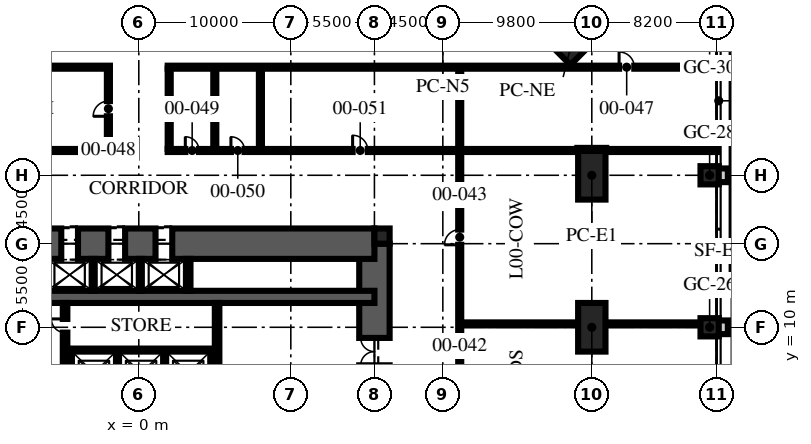
"""IFC4 building model, lengths in metres.
Left out: names, types, materials, properties, quantities, classifications, styles, units other than length and angle.
Written with IfcOpenShell. Run it as: python <this file> out.ifc"""

import sys

from ifc_helpers import new_model, si_unit, direction, frame, frame_2d, origin, origin_2d, place, context, subcontext, project, spatial, rectangle, hollow_rectangle, extrude, element, fill, save


model = new_model("IFC4")
c1 = context("Model", 3, precision=1e-05, world=origin(), true_north=direction((0.0, 1.0)))
c2 = subcontext(c1, "Body", "Model", "MODEL_VIEW")
j1 = project(units=[si_unit("LENGTHUNIT", "METRE"), si_unit("PLANEANGLEUNIT", "RADIAN")], contexts=[c1])
p1 = place(None, origin())
s1 = spatial("IfcSite", under=j1, at=p1, CompositionType="ELEMENT")
p2 = place(p1, origin())
s2 = spatial("IfcBuilding", under=s1, at=p2, CompositionType="ELEMENT")
p3 = place(p2, origin())
s3 = spatial("IfcBuildingStorey", under=s2, at=p3, CompositionType="ELEMENT", Elevation=0.0)
p4 = place(p3, frame((15.5, -15.5, -0.3), z_axis=(0.0, 0.0, 1.0), x_axis=(0.0, 1.0, 0.0)))
e1 = element("IfcWall", 1, at=p4, inside=s3, PredefinedType="SHEAR", context=c2, shape_type="SweptSolid", body=[
    extrude(rectangle(XDim=31.0, YDim=2.0, at=frame_2d((15.5, 0.0))), origin(), (0.0, 0.0, 1.0), 6.0),
])
p5 = place(p4, frame((6.5, 0.0, 0.3)))
e2 = element("IfcOpeningElement", 2, at=p5, cuts=e1, PredefinedType="OPENING", context=c2, shape_type="SweptSolid", body=[
    extrude(rectangle(XDim=1.2, YDim=2.1, at=frame_2d((0.6, 1.05))), frame((0.0, 1.01, 0.0), z_axis=(0.0, -1.0, 0.0), x_axis=(1.0, 0.0, 0.0)), (0.0, 0.0, 1.0), 2.02),
])
p6 = place(p4, frame((23.0, 0.0, 0.3)))
e3 = element("IfcOpeningElement", 3, at=p6, cuts=e1, PredefinedType="OPENING", context=c2, shape_type="SweptSolid", body=[
    extrude(rectangle(XDim=1.8, YDim=2.1, at=frame_2d((0.9, 1.05))), frame((0.0, 1.01, 0.0), z_axis=(0.0, -1.0, 0.0), x_axis=(1.0, 0.0, 0.0)), (0.0, 0.0, 1.0), 2.02),
])
p7 = place(p3, frame((-15.5, 15.5, -0.3), z_axis=(0.0, 0.0, 1.0), x_axis=(1.0, 0.0, 0.0)))
e4 = element("IfcWall", 4, at=p7, inside=s3, PredefinedType="SHEAR", context=c2, shape_type="SweptSolid", body=[
    extrude(rectangle(XDim=31.0, YDim=2.0, at=frame_2d((15.5, 0.0))), origin(), (0.0, 0.0, 1.0), 6.0),
])
p8 = place(p7, frame((10.4, 0.0, 0.3)))
e5 = element("IfcOpeningElement", 5, at=p8, cuts=e4, PredefinedType="OPENING", context=c2, shape_type="SweptSolid", body=[
    extrude(rectangle(XDim=1.1, YDim=2.1, at=frame_2d((0.55, 1.05))), frame((0.0, 1.01, 0.0), z_axis=(0.0, -1.0, 0.0), x_axis=(1.0, 0.0, 0.0)), (0.0, 0.0, 1.0), 2.02),
])
p9 = place(p7, frame((13.5, 0.0, 0.3)))
e6 = element("IfcOpeningElement", 6, at=p9, cuts=e4, PredefinedType="OPENING", context=c2, shape_type="SweptSolid", body=[
    extrude(rectangle(XDim=1.1, YDim=2.1, at=frame_2d((0.55, 1.05))), frame((0.0, 1.01, 0.0), z_axis=(0.0, -1.0, 0.0), x_axis=(1.0, 0.0, 0.0)), (0.0, 0.0, 1.0), 2.02),
])
p10 = place(p7, frame((16.6, 0.0, 0.3)))
e7 = element("IfcOpeningElement", 7, at=p10, cuts=e4, PredefinedType="OPENING", context=c2, shape_type="SweptSolid", body=[
    extrude(rectangle(XDim=1.1, YDim=2.1, at=frame_2d((0.55, 1.05))), frame((0.0, 1.01, 0.0), z_axis=(0.0, -1.0, 0.0), x_axis=(1.0, 0.0, 0.0)), (0.0, 0.0, 1.0), 2.02),
])
p11 = place(p3, frame((-15.5, 12.0, -0.3), z_axis=(0.0, 0.0, 1.0), x_axis=(1.0, 0.0, 0.0)))
e8 = element("IfcWall", 8, at=p11, inside=s3, PredefinedType="SHEAR", context=c2, shape_type="SweptSolid", body=[
    extrude(rectangle(XDim=31.0, YDim=0.8, at=frame_2d((15.5, 0.0))), origin(), (0.0, 0.0, 1.0), 6.0),
])
p12 = place(p3, frame((16.0, 16.0, -0.3), z_axis=(0.0, 0.0, 1.0), x_axis=(1.0, 0.0, 0.0)))
e9 = element("IfcColumn", 9, at=p12, inside=s3, PredefinedType="COLUMN", context=c2, shape_type="SweptSolid", body=[
    extrude(rectangle(XDim=1.0, YDim=1.0, at=origin_2d()), origin(), (0.0, 0.0, 1.0), 6.0),
])
for number, where, z_axis, x_axis in (
    (10, (29.8, 20.0, 0.0), (0.0, 0.0, 1.0), (0.0, 1.0, 0.0)),
    (11, (29.8, 10.0, 0.0), (0.0, 0.0, 1.0), (0.0, 1.0, 0.0)),
):
    element("IfcColumn", number, at=place(p3, frame(where, z_axis=z_axis, x_axis=x_axis)), inside=s3, PredefinedType="COLUMN", context=c2, shape_type="SweptSolid", body=[
        extrude(hollow_rectangle(XDim=3.2, YDim=1.8, WallThickness=0.2, at=origin_2d()), origin(), (0.0, 0.0, 1.0), 6.0),
    ])
p13 = place(p3, frame((28.394, 28.394, 0.0), z_axis=(0.0, 0.0, 1.0), x_axis=(0.707106781187, -0.707106781187, 0.0)))
e12 = element("IfcColumn", 12, at=p13, inside=s3, PredefinedType="COLUMN", context=c2, shape_type="SweptSolid", body=[
    extrude(hollow_rectangle(XDim=1.6, YDim=1.6, WallThickness=0.1, at=origin_2d()), origin(), (0.0, 0.0, 1.0), 6.0),
])
for number, where, z_axis, x_axis in (
    (13, (37.55, 10.0, 0.0), (0.0, 0.0, 1.0), (1.0, 0.0, 0.0)),
    (14, (37.55, 20.0, 0.0), (0.0, 0.0, 1.0), (1.0, 0.0, 0.0)),
):
    element("IfcColumn", number, at=place(p3, frame(where, z_axis=z_axis, x_axis=x_axis)), inside=s3, PredefinedType="COLUMN", context=c2, shape_type="SweptSolid", body=[
        extrude(rectangle(XDim=1.2, YDim=1.2, at=origin_2d()), origin(), (0.0, 0.0, 1.0), 6.0),
    ])
for number, where, z_axis, x_axis in (
    (15, (38.375, 9.55, -0.2), (0.0, 0.0, 1.0), (0.0, 1.0, 0.0)),
    (16, (38.375, 19.55, -0.2), (0.0, 0.0, 1.0), (0.0, 1.0, 0.0)),
):
    element("IfcWall", number, at=place(p3, frame(where, z_axis=z_axis, x_axis=x_axis)), inside=s3, PredefinedType="SOLIDWALL", context=c2, shape_type="SweptSolid", body=[
        extrude(rectangle(XDim=0.9, YDim=0.75, at=frame_2d((0.45, 0.0))), origin(), (0.0, 0.0, 1.0), 6.2),
    ])
p14 = place(p3, frame((-4.7, 8.5, 0.0), z_axis=(0.0, 0.0, 1.0), x_axis=(1.0, 0.0, 0.0)))
e17 = element("IfcWall", 17, at=p14, inside=s3, PredefinedType="PARTITIONING", context=c2, shape_type="SweptSolid", body=[
    extrude(rectangle(XDim=9.7, YDim=0.2, at=frame_2d((4.85, 0.0))), origin(), (0.0, 0.0, 1.0), 5.7),
])
for number, where, z_axis, x_axis in (
    (18, (-4.55, 5.6, 0.0), (0.0, 0.0, 1.0), (0.0, 1.0, 0.0)),
    (19, (4.85, 5.6, 0.0), (0.0, 0.0, 1.0), (0.0, 1.0, 0.0)),
):
    element("IfcWall", number, at=place(p3, frame(where, z_axis=z_axis, x_axis=x_axis)), inside=s3, PredefinedType="PARTITIONING", context=c2, shape_type="SweptSolid", body=[
        extrude(rectangle(XDim=2.8, YDim=0.3, at=frame_2d((1.4, 0.0))), origin(), (0.0, 0.0, 1.0), 5.7),
    ])
for number, where, z_axis, x_axis in (
    (20, (-1.4, 5.6, 0.0), (0.0, 0.0, 1.0), (0.0, 1.0, 0.0)),
    (21, (1.7, 5.6, 0.0), (0.0, 0.0, 1.0), (0.0, 1.0, 0.0)),
):
    element("IfcWall", number, at=place(p3, frame(where, z_axis=z_axis, x_axis=x_axis)), inside=s3, PredefinedType="PARTITIONING", context=c2, shape_type="SweptSolid", body=[
        extrude(rectangle(XDim=2.8, YDim=0.2, at=frame_2d((1.4, 0.0))), origin(), (0.0, 0.0, 1.0), 5.7),
    ])
p15 = place(p3, frame((3.25, 12.4, 0.0), z_axis=(0.0, 0.0, 1.0), x_axis=(0.0, 1.0, 0.0)))
e22 = element("IfcWall", 22, at=p15, inside=s3, PredefinedType="PARTITIONING", context=c2, shape_type="SweptSolid", body=[
    extrude(rectangle(XDim=2.1, YDim=0.3, at=frame_2d((1.05, 0.0))), origin(), (0.0, 0.0, 1.0), 5.7),
])
for number, where, z_axis, x_axis in (
    (23, (-3.0, 12.4, 0.0), (0.0, 0.0, 1.0), (0.0, 1.0, 0.0)),
    (24, (0.1, 12.4, 0.0), (0.0, 0.0, 1.0), (0.0, 1.0, 0.0)),
):
    element("IfcWall", number, at=place(p3, frame(where, z_axis=z_axis, x_axis=x_axis)), inside=s3, PredefinedType="PARTITIONING", context=c2, shape_type="SweptSolid", body=[
        extrude(rectangle(XDim=2.1, YDim=0.2, at=frame_2d((1.05, 0.0))), origin(), (0.0, 0.0, 1.0), 5.7),
    ])
p16 = place(p3, frame((-4.85, 5.3, 0.0), z_axis=(0.0, 0.0, 1.0), x_axis=(0.0, 1.0, 0.0)))
e25 = element("IfcWall", 25, at=p16, inside=s3, PredefinedType="PARTITIONING", context=c2, shape_type="SweptSolid", body=[
    extrude(rectangle(XDim=6.3, YDim=0.3, at=frame_2d((3.15, 0.0))), origin(), (0.0, 0.0, 1.0), 5.7),
])
p17 = place(p16, frame((4.35, 0.0, 0.0)))
e26 = element("IfcOpeningElement", 26, at=p17, cuts=e25, PredefinedType="OPENING", context=c2, shape_type="SweptSolid", body=[
    extrude(rectangle(XDim=0.9, YDim=2.1, at=frame_2d((0.45, 1.05))), frame((0.0, 0.16, 0.0), z_axis=(0.0, -1.0, 0.0), x_axis=(1.0, 0.0, 0.0)), (0.0, 0.0, 1.0), 0.32),
])
p18 = place(p3, frame((5.15, 5.3, 0.0), z_axis=(0.0, 0.0, 1.0), x_axis=(0.0, 1.0, 0.0)))
e27 = element("IfcWall", 27, at=p18, inside=s3, PredefinedType="PARTITIONING", context=c2, shape_type="SweptSolid", body=[
    extrude(rectangle(XDim=6.3, YDim=0.3, at=frame_2d((3.15, 0.0))), origin(), (0.0, 0.0, 1.0), 5.7),
])
p19 = place(p3, frame((21.111, -20.491, 0.0), z_axis=(0.0, 0.0, 1.0), x_axis=(0.0, 1.0, 0.0)))
e28 = element("IfcWall", 28, at=p19, inside=s3, PredefinedType="SOLIDWALL", context=c2, shape_type="SweptSolid", body=[
    extrude(rectangle(XDim=42.022, YDim=0.2, at=frame_2d((21.011, 0.0))), origin(), (0.0, 0.0, 1.0), 4.5),
])
p20 = place(p19, frame((5.962, 0.0, 0.0)))
e29 = element("IfcOpeningElement", 29, at=p20, cuts=e28, PredefinedType="OPENING", context=c2, shape_type="SweptSolid", body=[
    extrude(rectangle(XDim=1.8, YDim=2.4, at=frame_2d((0.9, 1.2))), frame((0.0, 0.11, 0.0), z_axis=(0.0, -1.0, 0.0), x_axis=(1.0, 0.0, 0.0)), (0.0, 0.0, 1.0), 0.22),
])
p21 = place(p19, frame((17.546, 0.0, 0.0)))
e30 = element("IfcOpeningElement", 30, at=p21, cuts=e28, PredefinedType="OPENING", context=c2, shape_type="SweptSolid", body=[
    extrude(rectangle(XDim=1.0, YDim=2.1, at=frame_2d((0.5, 1.05))), frame((0.0, 0.11, 0.0), z_axis=(0.0, -1.0, 0.0), x_axis=(1.0, 0.0, 0.0)), (0.0, 0.0, 1.0), 0.22),
])
p22 = place(p19, frame((25.991, 0.0, 0.0)))
e31 = element("IfcOpeningElement", 31, at=p22, cuts=e28, PredefinedType="OPENING", context=c2, shape_type="SweptSolid", body=[
    extrude(rectangle(XDim=1.0, YDim=2.1, at=frame_2d((0.5, 1.05))), frame((0.0, 0.11, 0.0), z_axis=(0.0, -1.0, 0.0), x_axis=(1.0, 0.0, 0.0)), (0.0, 0.0, 1.0), 0.22),
])
p23 = place(p19, frame((35.917, 0.0, 0.0)))
e32 = element("IfcOpeningElement", 32, at=p23, cuts=e28, PredefinedType="OPENING", context=c2, shape_type="SweptSolid", body=[
    extrude(rectangle(XDim=1.0, YDim=2.1, at=frame_2d((0.5, 1.05))), frame((0.0, 0.11, 0.0), z_axis=(0.0, -1.0, 0.0), x_axis=(1.0, 0.0, 0.0)), (0.0, 0.0, 1.0), 0.22),
])
p24 = place(p3, frame((21.211, 10.222, 0.0), z_axis=(0.0, 0.0, 1.0), x_axis=(1.0, 0.0, 0.0)))
e33 = element("IfcWall", 33, at=p24, inside=s3, PredefinedType="SOLIDWALL", context=c2, shape_type="SweptSolid", body=[
    extrude(rectangle(XDim=7.659, YDim=0.2, at=frame_2d((3.83, 0.0))), origin(), (0.0, 0.0, 1.0), 4.5),
])
p25 = place(p3, frame((30.73, 10.222, 0.0), z_axis=(0.0, 0.0, 1.0), x_axis=(1.0, 0.0, 0.0)))
e34 = element("IfcWall", 34, at=p25, inside=s3, PredefinedType="SOLIDWALL", context=c2, shape_type="SweptSolid", body=[
    extrude(rectangle(XDim=6.19, YDim=0.2, at=frame_2d((3.095, 0.0))), origin(), (0.0, 0.0, 1.0), 4.7),
])
p26 = place(p3, frame((-28.85, 21.631, 0.0), z_axis=(0.0, 0.0, 1.0), x_axis=(1.0, 0.0, 0.0)))
e35 = element("IfcWall", 35, at=p26, inside=s3, PredefinedType="SOLIDWALL", context=c2, shape_type="SweptSolid", body=[
    extrude(rectangle(XDim=26.95, YDim=0.2, at=frame_2d((13.475, 0.0))), origin(), (0.0, 0.0, 1.0), 4.5),
])
p27 = place(p3, frame((1.9, 21.631, 0.0), z_axis=(0.0, 0.0, 1.0), x_axis=(1.0, 0.0, 0.0)))
e36 = element("IfcWall", 36, at=p27, inside=s3, PredefinedType="SOLIDWALL", context=c2, shape_type="SweptSolid", body=[
    extrude(rectangle(XDim=26.95, YDim=0.2, at=frame_2d((13.475, 0.0))), origin(), (0.0, 0.0, 1.0), 4.5),
])
p28 = place(p27, frame((1.16, 0.0, 0.0)))
e37 = element("IfcOpeningElement", 37, at=p28, cuts=e36, PredefinedType="OPENING", context=c2, shape_type="SweptSolid", body=[
    extrude(rectangle(XDim=0.9, YDim=2.1, at=frame_2d((0.45, 1.05))), frame((0.0, 0.11, 0.0), z_axis=(0.0, -1.0, 0.0), x_axis=(1.0, 0.0, 0.0)), (0.0, 0.0, 1.0), 0.22),
])
p29 = place(p27, frame((4.16, 0.0, 0.0)))
e38 = element("IfcOpeningElement", 38, at=p29, cuts=e36, PredefinedType="OPENING", context=c2, shape_type="SweptSolid", body=[
    extrude(rectangle(XDim=0.9, YDim=2.1, at=frame_2d((0.45, 1.05))), frame((0.0, 0.11, 0.0), z_axis=(0.0, -1.0, 0.0), x_axis=(1.0, 0.0, 0.0)), (0.0, 0.0, 1.0), 0.22),
])
p30 = place(p27, frame((12.166, 0.0, 0.0)))
e39 = element("IfcOpeningElement", 39, at=p30, cuts=e36, PredefinedType="OPENING", context=c2, shape_type="SweptSolid", body=[
    extrude(rectangle(XDim=1.0, YDim=2.1, at=frame_2d((0.5, 1.05))), frame((0.0, 0.11, 0.0), z_axis=(0.0, -1.0, 0.0), x_axis=(1.0, 0.0, 0.0)), (0.0, 0.0, 1.0), 0.22),
])
p31 = place(p3, frame((30.75, 21.631, 0.0), z_axis=(0.0, 0.0, 1.0), x_axis=(1.0, 0.0, 0.0)))
e40 = element("IfcWall", 40, at=p31, inside=s3, PredefinedType="SOLIDWALL", context=c2, shape_type="SweptSolid", body=[
    extrude(rectangle(XDim=7.325, YDim=0.2, at=frame_2d((3.663, 0.0))), origin(), (0.0, 0.0, 1.0), 4.7),
])
p32 = place(p3, frame((28.85, 21.702, 0.0), z_axis=(0.0, 0.0, 1.0), x_axis=(1.0, 0.0, 0.0)))
e41 = element("IfcWall", 41, at=p32, inside=s3, PredefinedType="SOLIDWALL", context=c2, shape_type="SweptSolid", body=[
    extrude(rectangle(XDim=1.9, YDim=0.2, at=frame_2d((0.95, 0.0))), origin(), (0.0, 0.0, 1.0), 4.7),
])
p33 = place(p3, frame((-2.0, 21.731, 0.0), z_axis=(0.0, 0.0, 1.0), x_axis=(0.0, 1.0, 0.0)))
e42 = element("IfcWall", 42, at=p33, inside=s3, PredefinedType="SOLIDWALL", context=c2, shape_type="SweptSolid", body=[
    extrude(rectangle(XDim=5.28, YDim=0.2, at=frame_2d((2.64, 0.0))), origin(), (0.0, 0.0, 1.0), 5.7),
])
p34 = place(p33, frame((2.15, 0.0, 0.0)))
e43 = element("IfcOpeningElement", 43, at=p34, cuts=e42, PredefinedType="OPENING", context=c2, shape_type="SweptSolid", body=[
    extrude(rectangle(XDim=1.0, YDim=2.1, at=frame_2d((0.5, 1.05))), frame((0.0, 0.11, 0.0), z_axis=(0.0, -1.0, 0.0), x_axis=(1.0, 0.0, 0.0)), (0.0, 0.0, 1.0), 0.22),
])
p35 = place(p3, frame((2.0, 21.731, 0.0), z_axis=(0.0, 0.0, 1.0), x_axis=(0.0, 1.0, 0.0)))
e44 = element("IfcWall", 44, at=p35, inside=s3, PredefinedType="SOLIDWALL", context=c2, shape_type="SweptSolid", body=[
    extrude(rectangle(XDim=5.28, YDim=0.2, at=frame_2d((2.64, 0.0))), origin(), (0.0, 0.0, 1.0), 5.7),
])
p36 = place(p3, frame((5.0, 21.731, 0.0), z_axis=(0.0, 0.0, 1.0), x_axis=(0.0, 1.0, 0.0)))
e45 = element("IfcWall", 45, at=p36, inside=s3, PredefinedType="SOLIDWALL", context=c2, shape_type="SweptSolid", body=[
    extrude(rectangle(XDim=5.28, YDim=0.2, at=frame_2d((2.64, 0.0))), origin(), (0.0, 0.0, 1.0), 4.7),
])
for number, where, z_axis, x_axis in (
    (46, (8.0, 21.731, 0.0), (0.0, 0.0, 1.0), (0.0, 1.0, 0.0)),
    (47, (21.111, 21.731, 0.0), (0.0, 0.0, 1.0), (0.0, 1.0, 0.0)),
):
    element("IfcWall", number, at=place(p3, frame(where, z_axis=z_axis, x_axis=x_axis)), inside=s3, PredefinedType="SOLIDWALL", context=c2, shape_type="SweptSolid", body=[
        extrude(rectangle(XDim=5.28, YDim=0.2, at=frame_2d((2.64, 0.0))), origin(), (0.0, 0.0, 1.0), 5.7),
    ])
p37 = place(p3, frame((-38.075, 27.111, 0.0), z_axis=(0.0, 0.0, 1.0), x_axis=(1.0, 0.0, 0.0)))
e48 = element("IfcWall", 48, at=p37, inside=s3, PredefinedType="SOLIDWALL", context=c2, shape_type="SweptSolid", body=[
    extrude(rectangle(XDim=36.175, YDim=0.2, at=frame_2d((18.087, 0.0))), origin(), (0.0, 0.0, 1.0), 4.5),
])
p38 = place(p37, frame((3.115, 0.0, 0.0)))
e49 = element("IfcOpeningElement", 49, at=p38, cuts=e48, PredefinedType="OPENING", context=c2, shape_type="SweptSolid", body=[
    extrude(rectangle(XDim=0.9, YDim=2.1, at=frame_2d((0.45, 1.05))), frame((0.0, 0.11, 0.0), z_axis=(0.0, -1.0, 0.0), x_axis=(1.0, 0.0, 0.0)), (0.0, 0.0, 1.0), 0.22),
])
p39 = place(p37, frame((11.227, 0.0, 0.0)))
e50 = element("IfcOpeningElement", 50, at=p39, cuts=e48, PredefinedType="OPENING", context=c2, shape_type="SweptSolid", body=[
    extrude(rectangle(XDim=1.0, YDim=2.1, at=frame_2d((0.5, 1.05))), frame((0.0, 0.11, 0.0), z_axis=(0.0, -1.0, 0.0), x_axis=(1.0, 0.0, 0.0)), (0.0, 0.0, 1.0), 0.22),
])
p40 = place(p37, frame((14.469, 0.0, 0.0)))
e51 = element("IfcOpeningElement", 51, at=p40, cuts=e48, PredefinedType="OPENING", context=c2, shape_type="SweptSolid", body=[
    extrude(rectangle(XDim=0.9, YDim=2.1, at=frame_2d((0.45, 1.05))), frame((0.0, 0.11, 0.0), z_axis=(0.0, -1.0, 0.0), x_axis=(1.0, 0.0, 0.0)), (0.0, 0.0, 1.0), 0.22),
])
p41 = place(p3, frame((1.9, 27.111, 0.0), z_axis=(0.0, 0.0, 1.0), x_axis=(1.0, 0.0, 0.0)))
e52 = element("IfcWall", 52, at=p41, inside=s3, PredefinedType="SOLIDWALL", context=c2, shape_type="SweptSolid", body=[
    extrude(rectangle(XDim=36.175, YDim=0.2, at=frame_2d((18.087, 0.0))), origin(), (0.0, 0.0, 1.0), 4.5),
])
p42 = place(p41, frame((29.695, 0.0, 0.0)))
e53 = element("IfcOpeningElement", 53, at=p42, cuts=e52, PredefinedType="OPENING", context=c2, shape_type="SweptSolid", body=[
    extrude(rectangle(XDim=1.0, YDim=2.1, at=frame_2d((0.5, 1.05))), frame((0.0, 0.11, 0.0), z_axis=(0.0, -1.0, 0.0), x_axis=(1.0, 0.0, 0.0)), (0.0, 0.0, 1.0), 0.22),
])
p43 = place(p6, origin())
e54 = element("IfcDoor", 54, at=p43, inside=s3, OperationType="DOUBLE_DOOR_SINGLE_SWING", PredefinedType="DOOR", context=c2, shape_type="SweptSolid", body=[
    extrude(rectangle(XDim=1.8, YDim=2.1, at=frame_2d((0.9, 1.05))), frame((0.0, 0.025, 0.0), z_axis=(0.0, -1.0, 0.0), x_axis=(1.0, 0.0, 0.0)), (0.0, 0.0, 1.0), 0.05),
])
fill(e3, e54)
p44 = place(p8, origin())
e55 = element("IfcDoor", 55, at=p44, inside=s3, OperationType="DOUBLE_DOOR_SLIDING", PredefinedType="DOOR", context=c2, shape_type="SweptSolid", body=[
    extrude(rectangle(XDim=1.1, YDim=2.1, at=frame_2d((0.55, 1.05))), frame((0.0, 0.025, 0.0), z_axis=(0.0, -1.0, 0.0), x_axis=(1.0, 0.0, 0.0)), (0.0, 0.0, 1.0), 0.05),
])
fill(e5, e55)
p45 = place(p9, origin())
e56 = element("IfcDoor", 56, at=p45, inside=s3, OperationType="DOUBLE_DOOR_SLIDING", PredefinedType="DOOR", context=c2, shape_type="SweptSolid", body=[
    extrude(rectangle(XDim=1.1, YDim=2.1, at=frame_2d((0.55, 1.05))), frame((0.0, 0.025, 0.0), z_axis=(0.0, -1.0, 0.0), x_axis=(1.0, 0.0, 0.0)), (0.0, 0.0, 1.0), 0.05),
])
fill(e6, e56)
p46 = place(p10, origin())
e57 = element("IfcDoor", 57, at=p46, inside=s3, OperationType="DOUBLE_DOOR_SLIDING", PredefinedType="DOOR", context=c2, shape_type="SweptSolid", body=[
    extrude(rectangle(XDim=1.1, YDim=2.1, at=frame_2d((0.55, 1.05))), frame((0.0, 0.025, 0.0), z_axis=(0.0, -1.0, 0.0), x_axis=(1.0, 0.0, 0.0)), (0.0, 0.0, 1.0), 0.05),
])
fill(e7, e57)
p47 = place(p17, origin())
e58 = element("IfcDoor", 58, at=p47, inside=s3, OperationType="SINGLE_SWING_RIGHT", PredefinedType="DOOR", context=c2, shape_type="SweptSolid", body=[
    extrude(rectangle(XDim=0.9, YDim=2.1, at=frame_2d((0.45, 1.05))), frame((0.0, 0.025, 0.0), z_axis=(0.0, -1.0, 0.0), x_axis=(1.0, 0.0, 0.0)), (0.0, 0.0, 1.0), 0.05),
])
fill(e26, e58)
p48 = place(p23, origin())
e59 = element("IfcDoor", 59, at=p48, inside=s3, OperationType="SINGLE_SWING_LEFT", PredefinedType="DOOR", context=c2, shape_type="SweptSolid", body=[
    extrude(rectangle(XDim=1.0, YDim=2.1, at=frame_2d((0.5, 1.05))), frame((0.0, 0.025, 0.0), z_axis=(0.0, -1.0, 0.0), x_axis=(1.0, 0.0, 0.0)), (0.0, 0.0, 1.0), 0.05),
])
fill(e32, e59)
p49 = place(p42, origin())
e60 = element("IfcDoor", 60, at=p49, inside=s3, OperationType="SINGLE_SWING_LEFT", PredefinedType="DOOR", context=c2, shape_type="SweptSolid", body=[
    extrude(rectangle(XDim=1.0, YDim=2.1, at=frame_2d((0.5, 1.05))), frame((0.0, 0.025, 0.0), z_axis=(0.0, -1.0, 0.0), x_axis=(1.0, 0.0, 0.0)), (0.0, 0.0, 1.0), 0.05),
])
fill(e53, e60)
p50 = place(p34, origin())
e61 = element("IfcDoor", 61, at=p50, inside=s3, OperationType="SINGLE_SWING_LEFT", PredefinedType="DOOR", context=c2, shape_type="SweptSolid", body=[
    extrude(rectangle(XDim=1.0, YDim=2.1, at=frame_2d((0.5, 1.05))), frame((0.0, 0.025, 0.0), z_axis=(0.0, -1.0, 0.0), x_axis=(1.0, 0.0, 0.0)), (0.0, 0.0, 1.0), 0.05),
])
fill(e43, e61)
p51 = place(p28, origin())
e62 = element("IfcDoor", 62, at=p51, inside=s3, OperationType="SINGLE_SWING_LEFT", PredefinedType="DOOR", context=c2, shape_type="SweptSolid", body=[
    extrude(rectangle(XDim=0.9, YDim=2.1, at=frame_2d((0.45, 1.05))), frame((0.0, 0.025, 0.0), z_axis=(0.0, -1.0, 0.0), x_axis=(1.0, 0.0, 0.0)), (0.0, 0.0, 1.0), 0.05),
])
fill(e37, e62)
p52 = place(p29, origin())
e63 = element("IfcDoor", 63, at=p52, inside=s3, OperationType="SINGLE_SWING_LEFT", PredefinedType="DOOR", context=c2, shape_type="SweptSolid", body=[
    extrude(rectangle(XDim=0.9, YDim=2.1, at=frame_2d((0.45, 1.05))), frame((0.0, 0.025, 0.0), z_axis=(0.0, -1.0, 0.0), x_axis=(1.0, 0.0, 0.0)), (0.0, 0.0, 1.0), 0.05),
])
fill(e38, e63)
p53 = place(p30, origin())
e64 = element("IfcDoor", 64, at=p53, inside=s3, OperationType="SINGLE_SWING_LEFT", PredefinedType="DOOR", context=c2, shape_type="SweptSolid", body=[
    extrude(rectangle(XDim=1.0, YDim=2.1, at=frame_2d((0.5, 1.05))), frame((0.0, 0.025, 0.0), z_axis=(0.0, -1.0, 0.0), x_axis=(1.0, 0.0, 0.0)), (0.0, 0.0, 1.0), 0.05),
])
fill(e39, e64)
save(model, sys.argv[1])
